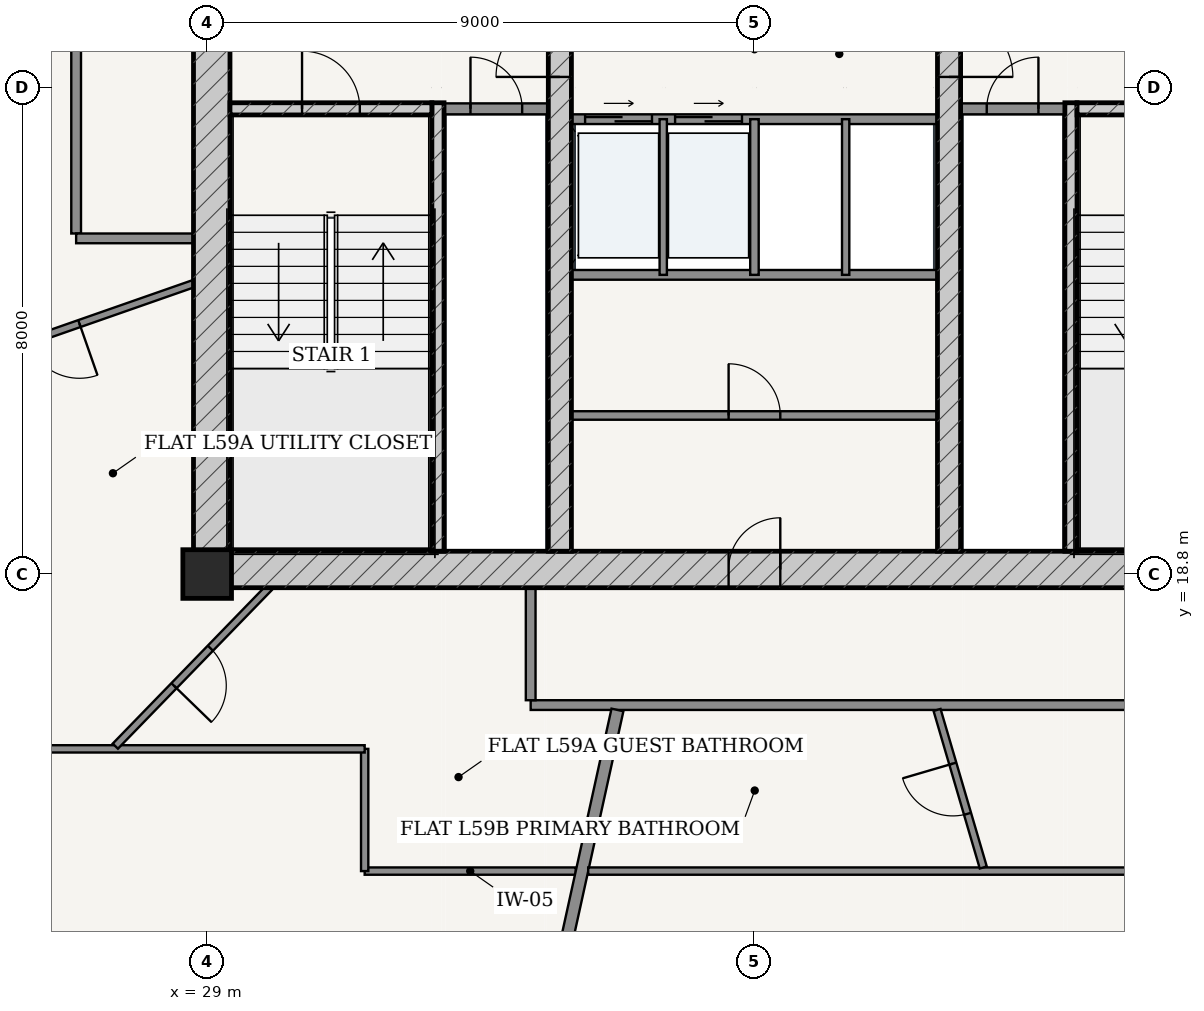
"""IFC4 building model, lengths in metres.
Left out: names, types, materials, properties, quantities, classifications, styles, units other than length and angle.
Written with IfcOpenShell. Run it as: python <this file> out.ifc"""

import sys

from ifc_helpers import new_model, si_unit, direction, frame, frame_2d, origin, origin_2d, place, context, subcontext, project, spatial, rectangle, extrude, source, transform, mapped, element, fill, save


model = new_model("IFC4")
c1 = context("Model", 3, precision=1e-05, world=origin(), true_north=direction((-0.2419218956, 0.970295726276)))
c2 = subcontext(c1, "Body", "Model", "MODEL_VIEW")
j1 = project(units=[si_unit("LENGTHUNIT", "METRE"), si_unit("PLANEANGLEUNIT", "RADIAN")], contexts=[c1])
p1 = place(None, origin())
s1 = spatial("IfcSite", under=j1, at=p1, CompositionType="ELEMENT")
p2 = place(p1, origin())
s2 = spatial("IfcBuilding", under=s1, at=p2, CompositionType="ELEMENT")
p3 = place(p2, frame((0.0, 0.0, 224.5)))
s3 = spatial("IfcBuildingStorey", under=s2, at=p3, CompositionType="ELEMENT", Elevation=224.5)
p4 = place(p3, frame((29.0, 18.8, 0.0), z_axis=(0.0, 0.0, 1.0), x_axis=(1.0, 0.0, 0.0)))
e1 = element("IfcColumn", 1, at=p4, inside=s3, PredefinedType="COLUMN", context=c2, shape_type="SweptSolid", body=[
    extrude(rectangle(XDim=0.8, YDim=0.8, at=origin_2d()), origin(), (0.0, 0.0, 1.0), 3.7),
])
p5 = place(p3, frame((28.775, 18.875, 0.0), z_axis=(0.0, 0.0, 1.0), x_axis=(1.0, 0.0, 0.0)))
e2 = element("IfcWall", 2, at=p5, inside=s3, PredefinedType="SHEAR", context=c2, shape_type="SweptSolid", body=[
    extrude(rectangle(XDim=18.45, YDim=0.6, at=frame_2d((9.225, 0.0))), origin(), (0.0, 0.0, 1.0), 3.435),
])
p6 = place(p5, frame((8.8, 0.0, 0.0)))
e3 = element("IfcOpeningElement", 3, at=p6, cuts=e2, PredefinedType="OPENING", context=c2, shape_type="SweptSolid", body=[
    extrude(rectangle(XDim=0.85, YDim=2.1, at=frame_2d((0.425, 1.05))), frame((0.0, 0.31, 0.0), z_axis=(0.0, -1.0, 0.0), x_axis=(1.0, 0.0, 0.0)), (0.0, 0.0, 1.0), 0.62),
])
p7 = place(p3, frame((29.075, 19.175, 0.0), z_axis=(0.0, 0.0, 1.0), x_axis=(0.0, 1.0, 0.0)))
e4 = element("IfcWall", 4, at=p7, inside=s3, PredefinedType="SHEAR", context=c2, shape_type="SweptSolid", body=[
    extrude(rectangle(XDim=15.25, YDim=0.6, at=frame_2d((7.625, 0.0))), origin(), (0.0, 0.0, 1.0), 3.435),
])
p8 = place(p7, frame((9.875, 0.0, 0.0)))
e5 = element("IfcOpeningElement", 5, at=p8, cuts=e4, PredefinedType="OPENING", context=c2, shape_type="SweptSolid", body=[
    extrude(rectangle(XDim=1.5, YDim=2.2, at=frame_2d((0.75, 1.1))), frame((0.0, 0.31, 0.0), z_axis=(0.0, -1.0, 0.0), x_axis=(1.0, 0.0, 0.0)), (0.0, 0.0, 1.0), 0.62),
])
p9 = place(p3, frame((32.795, 19.175, 0.0), z_axis=(0.0, 0.0, 1.0), x_axis=(0.0, 1.0, 0.0)))
e6 = element("IfcWall", 6, at=p9, inside=s3, PredefinedType="SOLIDWALL", context=c2, shape_type="SweptSolid", body=[
    extrude(rectangle(XDim=7.375, YDim=0.2, at=frame_2d((3.688, 0.0))), origin(), (0.0, 0.0, 1.0), 3.435),
])
p10 = place(p3, frame((29.375, 26.45, 0.0), z_axis=(0.0, 0.0, 1.0), x_axis=(1.0, 0.0, 0.0)))
e7 = element("IfcWall", 7, at=p10, inside=s3, PredefinedType="SOLIDWALL", context=c2, shape_type="SweptSolid", body=[
    extrude(rectangle(XDim=3.32, YDim=0.2, at=frame_2d((1.66, 0.0))), origin(), (0.0, 0.0, 1.0), 3.435),
])
p11 = place(p10, frame((1.185, 0.0, 0.0)))
e8 = element("IfcOpeningElement", 8, at=p11, cuts=e7, PredefinedType="OPENING", context=c2, shape_type="SweptSolid", body=[
    extrude(rectangle(XDim=0.95, YDim=2.15, at=frame_2d((0.475, 1.075))), frame((0.0, 0.11, 0.0), z_axis=(0.0, -1.0, 0.0), x_axis=(1.0, 0.0, 0.0)), (0.0, 0.0, 1.0), 0.22),
])
p12 = place(p3, frame((43.205, 19.175, 0.0), z_axis=(0.0, 0.0, 1.0), x_axis=(0.0, 1.0, 0.0)))
e9 = element("IfcWall", 9, at=p12, inside=s3, PredefinedType="SOLIDWALL", context=c2, shape_type="SweptSolid", body=[
    extrude(rectangle(XDim=7.375, YDim=0.2, at=frame_2d((3.688, 0.0))), origin(), (0.0, 0.0, 1.0), 3.435),
])
p13 = place(p3, frame((43.305, 26.45, 0.0), z_axis=(0.0, 0.0, 1.0), x_axis=(1.0, 0.0, 0.0)))
e10 = element("IfcWall", 10, at=p13, inside=s3, PredefinedType="SOLIDWALL", context=c2, shape_type="SweptSolid", body=[
    extrude(rectangle(XDim=3.32, YDim=0.2, at=frame_2d((1.66, 0.0))), origin(), (0.0, 0.0, 1.0), 3.435),
])
p14 = place(p13, frame((1.185, 0.0, 0.0)))
e11 = element("IfcOpeningElement", 11, at=p14, cuts=e10, PredefinedType="OPENING", context=c2, shape_type="SweptSolid", body=[
    extrude(rectangle(XDim=0.95, YDim=2.15, at=frame_2d((0.475, 1.075))), frame((0.0, 0.11, 0.0), z_axis=(0.0, -1.0, 0.0), x_axis=(1.0, 0.0, 0.0)), (0.0, 0.0, 1.0), 0.22),
])
p15 = place(p3, frame((34.8, 19.175, 0.0), z_axis=(0.0, 0.0, 1.0), x_axis=(0.0, 1.0, 0.0)))
e12 = element("IfcWall", 12, at=p15, inside=s3, PredefinedType="SHEAR", context=c2, shape_type="SweptSolid", body=[
    extrude(rectangle(XDim=15.25, YDim=0.38, at=frame_2d((7.625, 0.0))), origin(), (0.0, 0.0, 1.0), 3.435),
])
p16 = place(p15, frame((7.8, 0.0, 0.0)))
e13 = element("IfcOpeningElement", 13, at=p16, cuts=e12, PredefinedType="OPENING", context=c2, shape_type="SweptSolid", body=[
    extrude(rectangle(XDim=1.05, YDim=2.15, at=frame_2d((0.525, 1.075))), frame((0.0, 0.2, 0.0), z_axis=(0.0, -1.0, 0.0), x_axis=(1.0, 0.0, 0.0)), (0.0, 0.0, 1.0), 0.4),
])
p17 = place(p3, frame((41.2, 19.175, 0.0), z_axis=(0.0, 0.0, 1.0), x_axis=(0.0, 1.0, 0.0)))
e14 = element("IfcWall", 14, at=p17, inside=s3, PredefinedType="SHEAR", context=c2, shape_type="SweptSolid", body=[
    extrude(rectangle(XDim=15.25, YDim=0.38, at=frame_2d((7.625, 0.0))), origin(), (0.0, 0.0, 1.0), 3.435),
])
p18 = place(p17, frame((7.8, 0.0, 0.0)))
e15 = element("IfcOpeningElement", 15, at=p18, cuts=e14, PredefinedType="OPENING", context=c2, shape_type="SweptSolid", body=[
    extrude(rectangle(XDim=1.05, YDim=2.15, at=frame_2d((0.525, 1.075))), frame((0.0, 0.2, 0.0), z_axis=(0.0, -1.0, 0.0), x_axis=(1.0, 0.0, 0.0)), (0.0, 0.0, 1.0), 0.4),
])
p19 = place(p3, frame((32.9, 26.45, 0.0), z_axis=(0.0, 0.0, 1.0), x_axis=(1.0, 0.0, 0.0)))
e16 = element("IfcWall", 16, at=p19, inside=s3, PredefinedType="PARTITIONING", context=c2, shape_type="SweptSolid", body=[
    extrude(rectangle(XDim=1.71, YDim=0.18, at=frame_2d((0.855, 0.0))), origin(), (0.0, 0.0, 1.0), 3.435),
])
p20 = place(p19, frame((0.43, 0.0, 0.0)))
e17 = element("IfcOpeningElement", 17, at=p20, cuts=e16, PredefinedType="OPENING", context=c2, shape_type="SweptSolid", body=[
    extrude(rectangle(XDim=0.85, YDim=2.1, at=frame_2d((0.425, 1.05))), frame((0.0, 0.1, 0.0), z_axis=(0.0, -1.0, 0.0), x_axis=(1.0, 0.0, 0.0)), (0.0, 0.0, 1.0), 0.2),
])
p21 = place(p3, frame((41.39, 26.45, 0.0), z_axis=(0.0, 0.0, 1.0), x_axis=(1.0, 0.0, 0.0)))
e18 = element("IfcWall", 18, at=p21, inside=s3, PredefinedType="PARTITIONING", context=c2, shape_type="SweptSolid", body=[
    extrude(rectangle(XDim=1.71, YDim=0.18, at=frame_2d((0.855, 0.0))), origin(), (0.0, 0.0, 1.0), 3.435),
])
p22 = place(p21, frame((0.43, 0.0, 0.0)))
e19 = element("IfcOpeningElement", 19, at=p22, cuts=e18, PredefinedType="OPENING", context=c2, shape_type="SweptSolid", body=[
    extrude(rectangle(XDim=0.85, YDim=2.1, at=frame_2d((0.425, 1.05))), frame((0.0, 0.1, 0.0), z_axis=(0.0, -1.0, 0.0), x_axis=(1.0, 0.0, 0.0)), (0.0, 0.0, 1.0), 0.2),
])
p23 = place(p3, frame((34.99, 26.28, 0.0), z_axis=(0.0, 0.0, 1.0), x_axis=(1.0, 0.0, 0.0)))
e20 = element("IfcWall", 20, at=p23, inside=s3, PredefinedType="PARTITIONING", context=c2, shape_type="SweptSolid", body=[
    extrude(rectangle(XDim=6.02, YDim=0.16, at=frame_2d((3.01, 0.0))), origin(), (0.0, 0.0, 1.0), 3.435),
])
p24 = place(p23, frame((0.225, 0.0, 0.0)))
e21 = element("IfcOpeningElement", 21, at=p24, cuts=e20, PredefinedType="OPENING", context=c2, shape_type="SweptSolid", body=[
    extrude(rectangle(XDim=1.1, YDim=2.2, at=frame_2d((0.55, 1.1))), frame((0.0, 0.09, 0.0), z_axis=(0.0, -1.0, 0.0), x_axis=(1.0, 0.0, 0.0)), (0.0, 0.0, 1.0), 0.18),
])
p25 = place(p23, frame((1.705, 0.0, 0.0)))
e22 = element("IfcOpeningElement", 22, at=p25, cuts=e20, PredefinedType="OPENING", context=c2, shape_type="SweptSolid", body=[
    extrude(rectangle(XDim=1.1, YDim=2.2, at=frame_2d((0.55, 1.1))), frame((0.0, 0.09, 0.0), z_axis=(0.0, -1.0, 0.0), x_axis=(1.0, 0.0, 0.0)), (0.0, 0.0, 1.0), 0.18),
])
p26 = place(p3, frame((34.99, 23.72, 0.0), z_axis=(0.0, 0.0, 1.0), x_axis=(1.0, 0.0, 0.0)))
e23 = element("IfcWall", 23, at=p26, inside=s3, PredefinedType="PARTITIONING", context=c2, shape_type="SweptSolid", body=[
    extrude(rectangle(XDim=6.02, YDim=0.16, at=frame_2d((3.01, 0.0))), origin(), (0.0, 0.0, 1.0), 3.435),
])
p27 = place(p3, frame((36.5, 23.72, 0.0), z_axis=(0.0, 0.0, 1.0), x_axis=(0.0, 1.0, 0.0)))
e24 = element("IfcWall", 24, at=p27, inside=s3, PredefinedType="PARTITIONING", context=c2, shape_type="SweptSolid", body=[
    extrude(rectangle(XDim=2.56, YDim=0.12, at=frame_2d((1.28, 0.0))), origin(), (0.0, 0.0, 1.0), 3.435),
])
p28 = place(p3, frame((38.0, 23.72, 0.0), z_axis=(0.0, 0.0, 1.0), x_axis=(0.0, 1.0, 0.0)))
e25 = element("IfcWall", 25, at=p28, inside=s3, PredefinedType="PARTITIONING", context=c2, shape_type="SweptSolid", body=[
    extrude(rectangle(XDim=2.56, YDim=0.14, at=frame_2d((1.28, 0.0))), origin(), (0.0, 0.0, 1.0), 3.435),
])
p29 = place(p3, frame((39.5, 23.72, 0.0), z_axis=(0.0, 0.0, 1.0), x_axis=(0.0, 1.0, 0.0)))
e26 = element("IfcWall", 26, at=p29, inside=s3, PredefinedType="PARTITIONING", context=c2, shape_type="SweptSolid", body=[
    extrude(rectangle(XDim=2.56, YDim=0.12, at=frame_2d((1.28, 0.0))), origin(), (0.0, 0.0, 1.0), 3.435),
])
p30 = place(p3, frame((34.99, 21.407, 0.0), z_axis=(0.0, 0.0, 1.0), x_axis=(1.0, 0.0, 0.0)))
e27 = element("IfcWall", 27, at=p30, inside=s3, PredefinedType="PARTITIONING", context=c2, shape_type="SweptSolid", body=[
    extrude(rectangle(XDim=6.02, YDim=0.14, at=frame_2d((3.01, 0.0))), origin(), (0.0, 0.0, 1.0), 3.435),
])
p31 = place(p30, frame((2.585, 0.0, 0.0)))
e28 = element("IfcOpeningElement", 28, at=p31, cuts=e27, PredefinedType="OPENING", context=c2, shape_type="SweptSolid", body=[
    extrude(rectangle(XDim=0.85, YDim=2.1, at=frame_2d((0.425, 1.05))), frame((0.0, 0.08, 0.0), z_axis=(0.0, -1.0, 0.0), x_axis=(1.0, 0.0, 0.0)), (0.0, 0.0, 1.0), 0.16),
])
p32 = place(p3, frame((26.845, 24.4, 0.0), z_axis=(0.0, 0.0, 1.0), x_axis=(0.0, 1.0, 0.0)))
e29 = element("IfcWall", 29, at=p32, inside=s3, PredefinedType="PARTITIONING", context=c2, shape_type="SweptSolid", body=[
    extrude(rectangle(XDim=10.625, YDim=0.16, at=frame_2d((5.312, 0.0))), origin(), (0.0, 0.0, 1.0), 2.951),
])
p33 = place(p3, frame((26.845, 24.32, 0.0), z_axis=(0.0, 0.0, 1.0), x_axis=(1.0, 0.0, 0.0)))
e30 = element("IfcWall", 30, at=p33, inside=s3, PredefinedType="PARTITIONING", context=c2, shape_type="SweptSolid", body=[
    extrude(rectangle(XDim=1.93, YDim=0.16, at=frame_2d((0.965, 0.0))), origin(), (0.0, 0.0, 1.0), 3.435),
])
p34 = place(p3, frame((34.32, 16.645, 0.0), z_axis=(0.0, 0.0, 1.0), x_axis=(1.0, 0.0, 0.0)))
e31 = element("IfcWall", 31, at=p34, inside=s3, PredefinedType="PARTITIONING", context=c2, shape_type="SweptSolid", body=[
    extrude(rectangle(XDim=14.835, YDim=0.16, at=frame_2d((7.417, 0.0))), origin(), (0.0, 0.0, 1.0), 2.951),
])
p35 = place(p34, frame((10.135, 0.0, 0.0)))
e32 = element("IfcOpeningElement", 32, at=p35, cuts=e31, PredefinedType="OPENING", context=c2, shape_type="SweptSolid", body=[
    extrude(rectangle(XDim=0.98, YDim=2.2, at=frame_2d((0.49, 1.1))), frame((0.0, 0.09, 0.0), z_axis=(0.0, -1.0, 0.0), x_axis=(1.0, 0.0, 0.0)), (0.0, 0.0, 1.0), 0.18),
])
p36 = place(p3, frame((34.32, 16.725, 0.0), z_axis=(0.0, 0.0, 1.0), x_axis=(0.0, 1.0, 0.0)))
e33 = element("IfcWall", 33, at=p36, inside=s3, PredefinedType="PARTITIONING", context=c2, shape_type="SweptSolid", body=[
    extrude(rectangle(XDim=1.85, YDim=0.16, at=frame_2d((0.925, 0.0))), origin(), (0.0, 0.0, 1.0), 3.435),
])
p37 = place(p3, frame((35.062, 13.915, 0.0), z_axis=(0.0, 0.0, 1.0), x_axis=(-1.0, 0.0, 0.0)))
e34 = element("IfcWall", 34, at=p37, inside=s3, PredefinedType="PARTITIONING", context=c2, shape_type="SweptSolid", body=[
    extrude(rectangle(XDim=3.472, YDim=0.12, at=frame_2d((1.736, 0.0))), origin(), (0.0, 0.0, 1.0), 2.951),
])
p38 = place(p3, frame((31.59, 13.915, 0.0), z_axis=(0.0, 0.0, 1.0), x_axis=(0.0, 1.0, 0.0)))
e35 = element("IfcWall", 35, at=p38, inside=s3, PredefinedType="PARTITIONING", context=c2, shape_type="SweptSolid", body=[
    extrude(rectangle(XDim=2.01, YDim=0.12, at=frame_2d((1.005, 0.0))), origin(), (0.0, 0.0, 1.0), 3.11),
])
p39 = place(p3, frame((31.59, 15.925, 0.0), z_axis=(0.0, 0.0, 1.0), x_axis=(-1.0, 0.0, 0.0)))
e36 = element("IfcWall", 36, at=p39, inside=s3, PredefinedType="PARTITIONING", context=c2, shape_type="SweptSolid", body=[
    extrude(rectangle(XDim=5.465, YDim=0.12, at=frame_2d((2.732, 0.0))), origin(), (0.0, 0.0, 1.0), 2.951),
])
p40 = place(p3, frame((28.775, 23.575, 0.0), z_axis=(0.0, 0.0, 1.0), x_axis=(-0.943974645063, -0.330017983569, 0.0)))
e37 = element("IfcWall", 37, at=p40, inside=s3, PredefinedType="PARTITIONING", context=c2, shape_type="SweptSolid", body=[
    extrude(rectangle(XDim=4.875, YDim=0.12, at=frame_2d((2.437, 0.0))), origin(), (0.0, 0.0, 1.0), 3.11),
])
p41 = place(p40, frame((1.987, 0.0, 0.0)))
e38 = element("IfcOpeningElement", 38, at=p41, cuts=e37, PredefinedType="OPENING", context=c2, shape_type="SweptSolid", body=[
    extrude(rectangle(XDim=0.9, YDim=2.15, at=frame_2d((0.45, 1.075))), frame((0.0, 0.07, 0.0), z_axis=(0.0, -1.0, 0.0), x_axis=(1.0, 0.0, 0.0)), (0.0, 0.0, 1.0), 0.14),
])
p42 = place(p3, frame((30.018, 18.575, 0.0), z_axis=(0.0, 0.0, 1.0), x_axis=(-0.696436677683, -0.717618250867, 0.0)))
e39 = element("IfcWall", 39, at=p42, inside=s3, PredefinedType="PARTITIONING", context=c2, shape_type="SweptSolid", body=[
    extrude(rectangle(XDim=3.631, YDim=0.12, at=frame_2d((1.815, 0.0))), origin(), (0.0, 0.0, 1.0), 2.951),
])
p43 = place(p42, frame((1.385, 0.0, 0.0)))
e40 = element("IfcOpeningElement", 40, at=p43, cuts=e39, PredefinedType="OPENING", context=c2, shape_type="SweptSolid", body=[
    extrude(rectangle(XDim=0.86, YDim=2.15, at=frame_2d((0.43, 1.075))), frame((0.0, 0.07, 0.0), z_axis=(0.0, -1.0, 0.0), x_axis=(1.0, 0.0, 0.0)), (0.0, 0.0, 1.0), 0.14),
])
p44 = place(p3, frame((35.747, 16.565, 0.0), z_axis=(0.0, 0.0, 1.0), x_axis=(-0.214957946814, -0.976623305631, 0.0)))
e41 = element("IfcWall", 41, at=p44, inside=s3, PredefinedType="PARTITIONING", context=c2, shape_type="SweptSolid", body=[
    extrude(rectangle(XDim=9.202, YDim=0.2, at=frame_2d((4.601, 0.0))), origin(), (0.0, 0.0, 1.0), 2.951),
])
p45 = place(p3, frame((51.885, 13.915, 0.0), z_axis=(0.0, 0.0, 1.0), x_axis=(-1.0, 0.0, 0.0)))
e42 = element("IfcWall", 42, at=p45, inside=s3, PredefinedType="PARTITIONING", context=c2, shape_type="SweptSolid", body=[
    extrude(rectangle(XDim=16.619, YDim=0.12, at=frame_2d((8.31, 0.0))), origin(), (0.0, 0.0, 1.0), 2.951),
])
p46 = place(p45, frame((6.797, 0.0, 0.0)))
e43 = element("IfcOpeningElement", 43, at=p46, cuts=e42, PredefinedType="OPENING", context=c2, shape_type="SweptSolid", body=[
    extrude(rectangle(XDim=0.9, YDim=2.15, at=frame_2d((0.45, 1.075))), frame((0.0, 0.07, 0.0), z_axis=(0.0, -1.0, 0.0), x_axis=(1.0, 0.0, 0.0)), (0.0, 0.0, 1.0), 0.14),
])
p47 = place(p45, frame((1.849, 0.0, 0.0)))
e44 = element("IfcOpeningElement", 44, at=p47, cuts=e42, PredefinedType="OPENING", context=c2, shape_type="SweptSolid", body=[
    extrude(rectangle(XDim=0.9, YDim=2.15, at=frame_2d((0.45, 1.075))), frame((0.0, 0.07, 0.0), z_axis=(0.0, -1.0, 0.0), x_axis=(1.0, 0.0, 0.0)), (0.0, 0.0, 1.0), 0.14),
])
p48 = place(p3, frame((41.003, 16.565, 0.0), z_axis=(0.0, 0.0, 1.0), x_axis=(0.281617901256, -0.959526632091, 0.0)))
e45 = element("IfcWall", 45, at=p48, inside=s3, PredefinedType="PARTITIONING", context=c2, shape_type="SweptSolid", body=[
    extrude(rectangle(XDim=2.7, YDim=0.12, at=frame_2d((1.35, 0.0))), origin(), (0.0, 0.0, 1.0), 3.11),
])
p49 = place(p48, frame((0.92, 0.0, 0.0)))
e46 = element("IfcOpeningElement", 46, at=p49, cuts=e45, PredefinedType="OPENING", context=c2, shape_type="SweptSolid", body=[
    extrude(rectangle(XDim=0.86, YDim=2.15, at=frame_2d((0.43, 1.075))), frame((0.0, 0.07, 0.0), z_axis=(0.0, -1.0, 0.0), x_axis=(1.0, 0.0, 0.0)), (0.0, 0.0, 1.0), 0.14),
])
m1 = source(origin(), c2, "Body", "SweptSolid", [
    extrude(rectangle(XDim=1.05, YDim=2.15, at=frame_2d((0.525, 1.075))), frame((0.0, 0.025, 0.0), z_axis=(0.0, -1.0, 0.0), x_axis=(1.0, 0.0, 0.0)), (0.0, 0.0, 1.0), 0.05),
])
p50 = place(p16, origin())
e47 = element("IfcDoor", 47, at=p50, inside=s3, OperationType="SINGLE_SWING_LEFT", PredefinedType="DOOR", context=c2, shape_type="MappedRepresentation", body=[
    mapped(m1, transform((0.0, 0.0, 0.0), scale=1.0)),
])
fill(e13, e47)
p51 = place(p18, frame((1.05, 0.0, 0.0), z_axis=(0.0, 0.0, 1.0), x_axis=(-1.0, 0.0, 0.0)))
e48 = element("IfcDoor", 48, at=p51, inside=s3, OperationType="SINGLE_SWING_RIGHT", PredefinedType="DOOR", context=c2, shape_type="MappedRepresentation", body=[
    mapped(m1, transform((0.0, 0.0, 0.0), scale=1.0)),
])
fill(e15, e48)
m2 = source(origin(), c2, "Body", "SweptSolid", [
    extrude(rectangle(XDim=0.95, YDim=2.15, at=frame_2d((0.475, 1.075))), frame((0.0, 0.025, 0.0), z_axis=(0.0, -1.0, 0.0), x_axis=(1.0, 0.0, 0.0)), (0.0, 0.0, 1.0), 0.05),
])
p52 = place(p11, origin())
e49 = element("IfcDoor", 49, at=p52, inside=s3, OperationType="SINGLE_SWING_LEFT", PredefinedType="DOOR", context=c2, shape_type="MappedRepresentation", body=[
    mapped(m2, transform((0.0, 0.0, 0.0), scale=1.0)),
])
fill(e8, e49)
m3 = source(origin(), c2, "Body", "SweptSolid", [
    extrude(rectangle(XDim=0.85, YDim=2.1, at=frame_2d((0.425, 1.05))), frame((0.0, 0.025, 0.0), z_axis=(0.0, -1.0, 0.0), x_axis=(1.0, 0.0, 0.0)), (0.0, 0.0, 1.0), 0.05),
])
p53 = place(p20, origin())
e50 = element("IfcDoor", 50, at=p53, inside=s3, OperationType="SINGLE_SWING_LEFT", PredefinedType="DOOR", context=c2, shape_type="MappedRepresentation", body=[
    mapped(m3, transform((0.0, 0.0, 0.0), scale=1.0)),
])
fill(e17, e50)
p54 = place(p22, origin())
e51 = element("IfcDoor", 51, at=p54, inside=s3, OperationType="SINGLE_SWING_RIGHT", PredefinedType="DOOR", context=c2, shape_type="MappedRepresentation", body=[
    mapped(m3, transform((0.0, 0.0, 0.0), scale=1.0)),
])
fill(e19, e51)
p55 = place(p6, origin())
e52 = element("IfcDoor", 52, at=p55, inside=s3, OperationType="SINGLE_SWING_RIGHT", PredefinedType="DOOR", context=c2, shape_type="MappedRepresentation", body=[
    mapped(m3, transform((0.0, 0.0, 0.0), scale=1.0)),
])
fill(e3, e52)
p56 = place(p31, origin())
e53 = element("IfcDoor", 53, at=p56, inside=s3, OperationType="SINGLE_SWING_LEFT", PredefinedType="DOOR", context=c2, shape_type="MappedRepresentation", body=[
    mapped(m3, transform((0.0, 0.0, 0.0), scale=1.0)),
])
fill(e28, e53)
m4 = source(origin(), c2, "Body", "SweptSolid", [
    extrude(rectangle(XDim=1.1, YDim=2.2, at=frame_2d((0.55, 1.1))), frame((0.0, 0.025, 0.0), z_axis=(0.0, -1.0, 0.0), x_axis=(1.0, 0.0, 0.0)), (0.0, 0.0, 1.0), 0.05),
])
p57 = place(p24, origin())
e54 = element("IfcDoor", 54, at=p57, inside=s3, OperationType="DOUBLE_DOOR_SLIDING", PredefinedType="DOOR", context=c2, shape_type="MappedRepresentation", body=[
    mapped(m4, transform((0.0, 0.0, 0.0), scale=1.0)),
])
fill(e21, e54)
p58 = place(p25, origin())
e55 = element("IfcDoor", 55, at=p58, inside=s3, OperationType="DOUBLE_DOOR_SLIDING", PredefinedType="DOOR", context=c2, shape_type="MappedRepresentation", body=[
    mapped(m4, transform((0.0, 0.0, 0.0), scale=1.0)),
])
fill(e22, e55)
m5 = source(origin(), c2, "Body", "SweptSolid", [
    extrude(rectangle(XDim=0.9, YDim=2.15, at=frame_2d((0.45, 1.075))), frame((0.0, 0.025, 0.0), z_axis=(0.0, -1.0, 0.0), x_axis=(1.0, 0.0, 0.0)), (0.0, 0.0, 1.0), 0.05),
])
p59 = place(p41, origin())
e56 = element("IfcDoor", 56, at=p59, inside=s3, OperationType="SINGLE_SWING_LEFT", PredefinedType="DOOR", context=c2, shape_type="MappedRepresentation", body=[
    mapped(m5, transform((0.0, 0.0, 0.0), scale=1.0)),
])
fill(e38, e56)
m6 = source(origin(), c2, "Body", "SweptSolid", [
    extrude(rectangle(XDim=0.86, YDim=2.15, at=frame_2d((0.43, 1.075))), frame((0.0, 0.025, 0.0), z_axis=(0.0, -1.0, 0.0), x_axis=(1.0, 0.0, 0.0)), (0.0, 0.0, 1.0), 0.05),
])
p60 = place(p43, origin())
e57 = element("IfcDoor", 57, at=p60, inside=s3, OperationType="SINGLE_SWING_RIGHT", PredefinedType="DOOR", context=c2, shape_type="MappedRepresentation", body=[
    mapped(m6, transform((0.0, 0.0, 0.0), scale=1.0)),
])
fill(e40, e57)
p61 = place(p49, frame((0.86, 0.0, 0.0), z_axis=(0.0, 0.0, 1.0), x_axis=(-1.0, 0.0, 0.0)))
e58 = element("IfcDoor", 58, at=p61, inside=s3, OperationType="SINGLE_SWING_RIGHT", PredefinedType="DOOR", context=c2, shape_type="MappedRepresentation", body=[
    mapped(m6, transform((0.0, 0.0, 0.0), scale=1.0)),
])
fill(e46, e58)
save(model, sys.argv[1])
